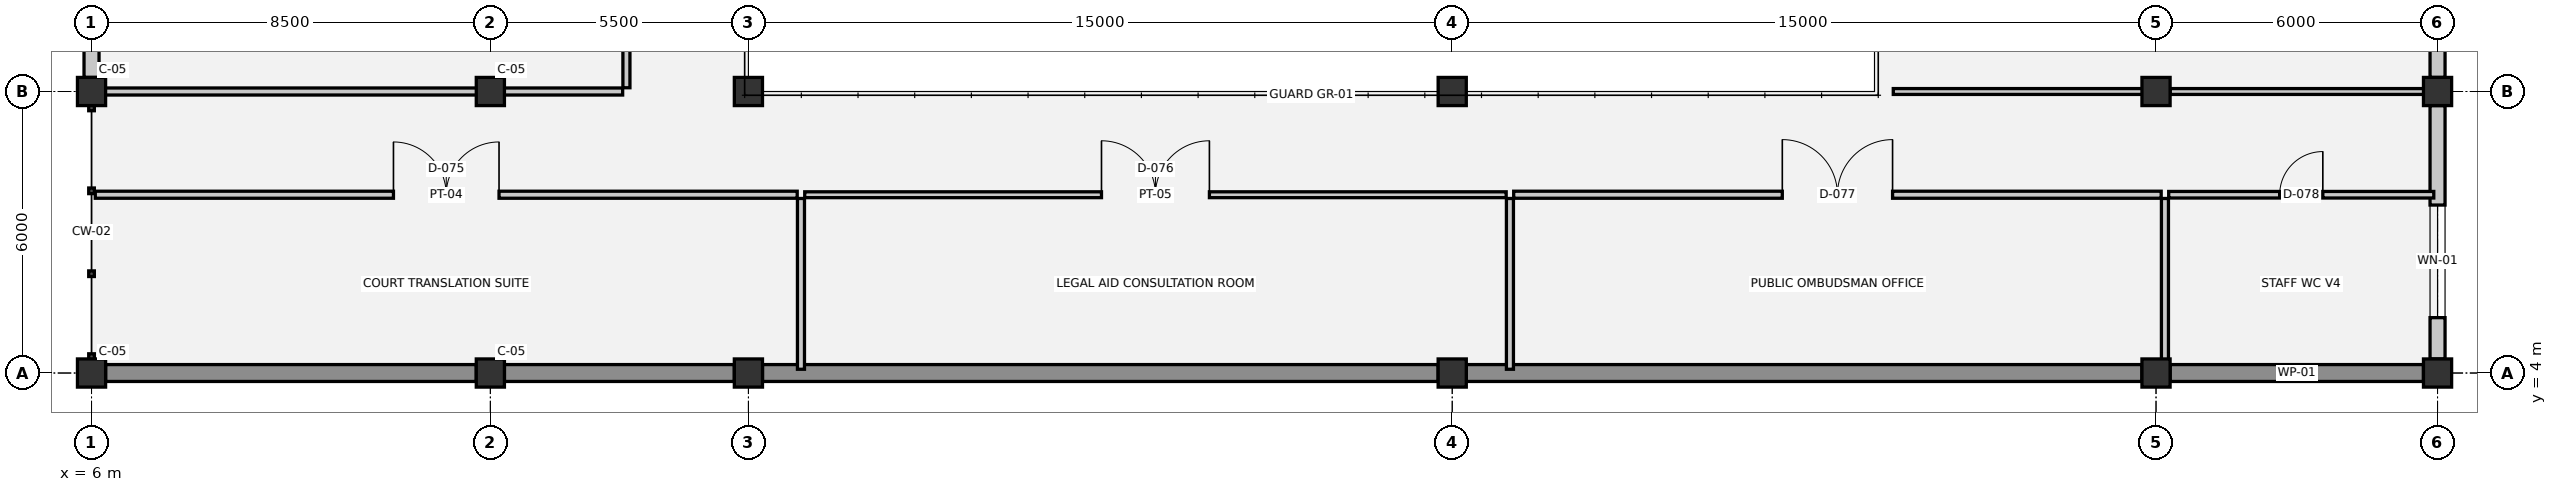
"""IFC4 building model, lengths in metres.
Left out: names, types, materials, properties, quantities, classifications, styles, units other than length and angle.
Written with IfcOpenShell. Run it as: python <this file> out.ifc"""

import sys

from ifc_helpers import new_model, si_unit, direction, frame, frame_2d, origin, origin_2d, place, context, subcontext, project, spatial, rectangle, extrude, element, fill, save


model = new_model("IFC4")
c1 = context("Model", 3, precision=1e-05, world=origin(), true_north=direction((0.0, 1.0)))
c2 = subcontext(c1, "Body", "Model", "MODEL_VIEW")
j1 = project(units=[si_unit("LENGTHUNIT", "METRE"), si_unit("PLANEANGLEUNIT", "RADIAN")], contexts=[c1])
p1 = place(None, origin())
s1 = spatial("IfcSite", under=j1, at=p1, CompositionType="ELEMENT")
p2 = place(p1, origin())
s2 = spatial("IfcBuilding", under=s1, at=p2, CompositionType="ELEMENT")
p3 = place(p2, frame((0.0, 0.0, 9.9)))
s3 = spatial("IfcBuildingStorey", under=s2, at=p3, CompositionType="ELEMENT", Elevation=9.9)
for number, where, z_axis, x_axis in (
    (1, (6.0, 4.0, 0.0), (0.0, 0.0, 1.0), (1.0, 0.0, 0.0)),
    (2, (6.0, 10.0, 0.0), (0.0, 0.0, 1.0), (1.0, 0.0, 0.0)),
    (3, (14.5, 4.0, 0.0), (0.0, 0.0, 1.0), (1.0, 0.0, 0.0)),
    (4, (14.5, 10.0, 0.0), (0.0, 0.0, 1.0), (1.0, 0.0, 0.0)),
    (5, (20.0, 4.0, 0.0), (0.0, 0.0, 1.0), (1.0, 0.0, 0.0)),
    (6, (20.0, 10.0, 0.0), (0.0, 0.0, 1.0), (1.0, 0.0, 0.0)),
    (7, (35.0, 4.0, 0.0), (0.0, 0.0, 1.0), (1.0, 0.0, 0.0)),
    (8, (35.0, 10.0, 0.0), (0.0, 0.0, 1.0), (1.0, 0.0, 0.0)),
    (9, (50.0, 4.0, 0.0), (0.0, 0.0, 1.0), (1.0, 0.0, 0.0)),
    (10, (50.0, 10.0, 0.0), (0.0, 0.0, 1.0), (1.0, 0.0, 0.0)),
    (11, (56.0, 4.0, 0.0), (0.0, 0.0, 1.0), (1.0, 0.0, 0.0)),
    (12, (56.0, 10.0, 0.0), (0.0, 0.0, 1.0), (1.0, 0.0, 0.0)),
):
    element("IfcColumn", number, at=place(p3, frame(where, z_axis=z_axis, x_axis=x_axis)), inside=s3, PredefinedType="COLUMN", context=c2, shape_type="SweptSolid", body=[
        extrude(rectangle(XDim=0.6, YDim=0.6, at=origin_2d()), origin(), (0.0, 0.0, 1.0), 4.5),
    ])
p4 = place(p3, frame((6.0, 10.3, 0.0), z_axis=(0.0, 0.0, 1.0), x_axis=(0.0, 1.0, 0.0)))
e13 = element("IfcWall", 13, at=p4, inside=s3, PredefinedType="SOLIDWALL", context=c2, shape_type="SweptSolid", body=[
    extrude(rectangle(XDim=6.4, YDim=0.32, at=frame_2d((3.2, 0.0))), origin(), (0.0, 0.0, 1.0), 3.26),
])
p5 = place(p4, frame((2.0, 0.0, 0.9)))
e14 = element("IfcOpeningElement", 14, at=p5, cuts=e13, PredefinedType="OPENING", context=c2, shape_type="SweptSolid", body=[
    extrude(rectangle(XDim=2.4, YDim=2.1, at=frame_2d((1.2, 1.05))), frame((0.0, 0.17, 0.0), z_axis=(0.0, -1.0, 0.0), x_axis=(1.0, 0.0, 0.0)), (0.0, 0.0, 1.0), 0.34),
])
p6 = place(p3, frame((56.0, 16.7, 0.0), z_axis=(0.0, 0.0, 1.0), x_axis=(0.0, -1.0, 0.0)))
e15 = element("IfcWall", 15, at=p6, inside=s3, PredefinedType="SOLIDWALL", context=c2, shape_type="SweptSolid", body=[
    extrude(rectangle(XDim=6.4, YDim=0.32, at=frame_2d((3.2, 0.0))), origin(), (0.0, 0.0, 1.0), 3.26),
])
p7 = place(p6, frame((1.975, 0.0, 0.0)))
e16 = element("IfcOpeningElement", 16, at=p7, cuts=e15, PredefinedType="OPENING", context=c2, shape_type="SweptSolid", body=[
    extrude(rectangle(XDim=1.65, YDim=2.2, at=frame_2d((0.825, 1.1))), frame((0.0, 0.17, 0.0), z_axis=(0.0, -1.0, 0.0), x_axis=(1.0, 0.0, 0.0)), (0.0, 0.0, 1.0), 0.34),
])
p8 = place(p3, frame((56.0, 9.7, 0.0), z_axis=(0.0, 0.0, 1.0), x_axis=(0.0, -1.0, 0.0)))
e17 = element("IfcWall", 17, at=p8, inside=s3, PredefinedType="SOLIDWALL", context=c2, shape_type="SweptSolid", body=[
    extrude(rectangle(XDim=5.4, YDim=0.32, at=frame_2d((2.7, 0.0))), origin(), (0.0, 0.0, 1.0), 3.26),
])
p9 = place(p8, frame((2.12, 0.0, 0.9)))
e18 = element("IfcOpeningElement", 18, at=p9, cuts=e17, PredefinedType="OPENING", context=c2, shape_type="SweptSolid", body=[
    extrude(rectangle(XDim=2.4, YDim=2.1, at=frame_2d((1.2, 1.05))), frame((0.0, 0.17, 0.0), z_axis=(0.0, -1.0, 0.0), x_axis=(1.0, 0.0, 0.0)), (0.0, 0.0, 1.0), 0.34),
])
p10 = place(p3, frame((55.7, 4.0, 0.0), z_axis=(0.0, 0.0, 1.0), x_axis=(-1.0, 0.0, 0.0)))
e19 = element("IfcWall", 19, at=p10, inside=s3, PredefinedType="SOLIDWALL", context=c2, shape_type="SweptSolid", body=[
    extrude(rectangle(XDim=5.4, YDim=0.36, at=frame_2d((2.7, 0.0))), origin(), (0.0, 0.0, 1.0), 4.24),
])
for number, where, z_axis, x_axis in (
    (20, (49.7, 4.0, 0.0), (0.0, 0.0, 1.0), (-1.0, 0.0, 0.0)),
    (21, (34.7, 4.0, 0.0), (0.0, 0.0, 1.0), (-1.0, 0.0, 0.0)),
):
    element("IfcWall", number, at=place(p3, frame(where, z_axis=z_axis, x_axis=x_axis)), inside=s3, PredefinedType="SOLIDWALL", context=c2, shape_type="SweptSolid", body=[
        extrude(rectangle(XDim=14.4, YDim=0.36, at=frame_2d((7.2, 0.0))), origin(), (0.0, 0.0, 1.0), 4.24),
    ])
p11 = place(p3, frame((19.7, 4.0, 0.0), z_axis=(0.0, 0.0, 1.0), x_axis=(-1.0, 0.0, 0.0)))
e22 = element("IfcWall", 22, at=p11, inside=s3, PredefinedType="SOLIDWALL", context=c2, shape_type="SweptSolid", body=[
    extrude(rectangle(XDim=4.9, YDim=0.36, at=frame_2d((2.45, 0.0))), origin(), (0.0, 0.0, 1.0), 4.24),
])
p12 = place(p3, frame((14.2, 4.0, 0.0), z_axis=(0.0, 0.0, 1.0), x_axis=(-1.0, 0.0, 0.0)))
e23 = element("IfcWall", 23, at=p12, inside=s3, PredefinedType="SOLIDWALL", context=c2, shape_type="SweptSolid", body=[
    extrude(rectangle(XDim=7.9, YDim=0.36, at=frame_2d((3.95, 0.0))), origin(), (0.0, 0.0, 1.0), 4.24),
])
p13 = place(p3, frame((6.08, 7.8, 0.0), z_axis=(0.0, 0.0, 1.0), x_axis=(1.0, 0.0, 0.0)))
e24 = element("IfcWall", 24, at=p13, inside=s3, PredefinedType="PARTITIONING", context=c2, shape_type="SweptSolid", body=[
    extrude(rectangle(XDim=14.96, YDim=0.15, at=frame_2d((7.48, 0.0))), origin(), (0.0, 0.0, 1.0), 4.14),
])
p14 = place(p13, frame((6.355, 0.0, 0.0)))
e25 = element("IfcOpeningElement", 25, at=p14, cuts=e24, PredefinedType="OPENING", context=c2, shape_type="SweptSolid", body=[
    extrude(rectangle(XDim=2.25, YDim=2.4, at=frame_2d((1.125, 1.2))), frame((0.0, 0.085, 0.0), z_axis=(0.0, -1.0, 0.0), x_axis=(1.0, 0.0, 0.0)), (0.0, 0.0, 1.0), 0.17),
])
p15 = place(p3, frame((21.2, 7.8, 0.0), z_axis=(0.0, 0.0, 1.0), x_axis=(1.0, 0.0, 0.0)))
e26 = element("IfcWall", 26, at=p15, inside=s3, PredefinedType="PARTITIONING", context=c2, shape_type="SweptSolid", body=[
    extrude(rectangle(XDim=14.95, YDim=0.125, at=frame_2d((7.475, 0.0))), origin(), (0.0, 0.0, 1.0), 4.14),
])
p16 = place(p15, frame((6.325, 0.0, 0.0)))
e27 = element("IfcOpeningElement", 27, at=p16, cuts=e26, PredefinedType="OPENING", context=c2, shape_type="SweptSolid", body=[
    extrude(rectangle(XDim=2.3, YDim=2.4, at=frame_2d((1.15, 1.2))), frame((0.0, 0.073, 0.0), z_axis=(0.0, -1.0, 0.0), x_axis=(1.0, 0.0, 0.0)), (0.0, 0.0, 1.0), 0.145),
])
p17 = place(p3, frame((36.31, 7.8, 0.0), z_axis=(0.0, 0.0, 1.0), x_axis=(1.0, 0.0, 0.0)))
e28 = element("IfcWall", 28, at=p17, inside=s3, PredefinedType="PARTITIONING", context=c2, shape_type="SweptSolid", body=[
    extrude(rectangle(XDim=13.8, YDim=0.15, at=frame_2d((6.9, 0.0))), origin(), (0.0, 0.0, 1.0), 4.14),
])
p18 = place(p17, frame((5.725, 0.0, 0.0)))
e29 = element("IfcOpeningElement", 29, at=p18, cuts=e28, PredefinedType="OPENING", context=c2, shape_type="SweptSolid", body=[
    extrude(rectangle(XDim=2.35, YDim=2.4, at=frame_2d((1.175, 1.2))), frame((0.0, 0.085, 0.0), z_axis=(0.0, -1.0, 0.0), x_axis=(1.0, 0.0, 0.0)), (0.0, 0.0, 1.0), 0.17),
])
p19 = place(p3, frame((50.27, 7.8, 0.0), z_axis=(0.0, 0.0, 1.0), x_axis=(1.0, 0.0, 0.0)))
e30 = element("IfcWall", 30, at=p19, inside=s3, PredefinedType="PLUMBINGWALL", context=c2, shape_type="SweptSolid", body=[
    extrude(rectangle(XDim=5.65, YDim=0.14, at=frame_2d((2.825, 0.0))), origin(), (0.0, 0.0, 1.0), 4.14),
])
p20 = place(p19, frame((2.365, 0.0, 0.0)))
e31 = element("IfcOpeningElement", 31, at=p20, cuts=e30, PredefinedType="OPENING", context=c2, shape_type="SweptSolid", body=[
    extrude(rectangle(XDim=0.92, YDim=2.1, at=frame_2d((0.46, 1.05))), frame((0.0, 0.08, 0.0), z_axis=(0.0, -1.0, 0.0), x_axis=(1.0, 0.0, 0.0)), (0.0, 0.0, 1.0), 0.16),
])
p21 = place(p3, frame((6.08, 10.0, 0.0), z_axis=(0.0, 0.0, 1.0), x_axis=(1.0, 0.0, 0.0)))
e32 = element("IfcWall", 32, at=p21, inside=s3, PredefinedType="PARTITIONING", context=c2, shape_type="SweptSolid", body=[
    extrude(rectangle(XDim=11.24, YDim=0.15, at=frame_2d((5.62, 0.0))), origin(), (0.0, 0.0, 1.0), 3.53),
])
p22 = place(p3, frame((44.4, 10.0, 0.0), z_axis=(0.0, 0.0, 1.0), x_axis=(1.0, 0.0, 0.0)))
e33 = element("IfcWall", 33, at=p22, inside=s3, PredefinedType="PARTITIONING", context=c2, shape_type="SweptSolid", body=[
    extrude(rectangle(XDim=5.9, YDim=0.125, at=frame_2d((2.95, 0.0))), origin(), (0.0, 0.0, 1.0), 3.28),
])
p23 = place(p3, frame((50.3, 10.0, 0.0), z_axis=(0.0, 0.0, 1.0), x_axis=(1.0, 0.0, 0.0)))
e34 = element("IfcWall", 34, at=p23, inside=s3, PredefinedType="PARTITIONING", context=c2, shape_type="SweptSolid", body=[
    extrude(rectangle(XDim=5.62, YDim=0.125, at=frame_2d((2.81, 0.0))), origin(), (0.0, 0.0, 1.0), 3.53),
])
p24 = place(p3, frame((17.4, 10.08, 0.0), z_axis=(0.0, 0.0, 1.0), x_axis=(0.0, 1.0, 0.0)))
e35 = element("IfcWall", 35, at=p24, inside=s3, PredefinedType="PARTITIONING", context=c2, shape_type="SweptSolid", body=[
    extrude(rectangle(XDim=14.72, YDim=0.15, at=frame_2d((7.36, 0.0))), origin(), (0.0, 0.0, 1.0), 4.14),
])
p25 = place(p24, frame((6.31, 0.0, 0.0)))
e36 = element("IfcOpeningElement", 36, at=p25, cuts=e35, PredefinedType="OPENING", context=c2, shape_type="SweptSolid", body=[
    extrude(rectangle(XDim=2.1, YDim=2.35, at=frame_2d((1.05, 1.175))), frame((0.0, 0.085, 0.0), z_axis=(0.0, -1.0, 0.0), x_axis=(1.0, 0.0, 0.0)), (0.0, 0.0, 1.0), 0.17),
])
for number, where, z_axis, x_axis in (
    (37, (21.12, 4.08, 0.0), (0.0, 0.0, 1.0), (0.0, 1.0, 0.0)),
    (38, (36.23, 4.08, 0.0), (0.0, 0.0, 1.0), (0.0, 1.0, 0.0)),
):
    element("IfcWall", number, at=place(p3, frame(where, z_axis=z_axis, x_axis=x_axis)), inside=s3, PredefinedType="PARTITIONING", context=c2, shape_type="SweptSolid", body=[
        extrude(rectangle(XDim=3.64, YDim=0.15, at=frame_2d((1.82, 0.0))), origin(), (0.0, 0.0, 1.0), 4.14),
    ])
p26 = place(p3, frame((50.19, 4.08, 0.0), z_axis=(0.0, 0.0, 1.0), x_axis=(0.0, 1.0, 0.0)))
e39 = element("IfcWall", 39, at=p26, inside=s3, PredefinedType="PARTITIONING", context=c2, shape_type="SweptSolid", body=[
    extrude(rectangle(XDim=3.64, YDim=0.15, at=frame_2d((1.82, 0.0))), origin(), (0.0, 0.0, 1.0), 3.68),
])
p27 = place(p9, origin())
e40 = element("IfcWindow", 40, at=p27, inside=s3, PartitioningType="SINGLE_PANEL", PredefinedType="WINDOW", context=c2, shape_type="SweptSolid", body=[
    extrude(rectangle(XDim=2.4, YDim=2.1, at=frame_2d((1.2, 1.05))), frame((0.0, 0.03, 0.0), z_axis=(0.0, -1.0, 0.0), x_axis=(1.0, 0.0, 0.0)), (0.0, 0.0, 1.0), 0.06),
])
fill(e18, e40)
p28 = place(p14, origin())
e41 = element("IfcDoor", 41, at=p28, inside=s3, OperationType="DOUBLE_DOOR_SINGLE_SWING", PredefinedType="DOOR", context=c2, shape_type="SweptSolid", body=[
    extrude(rectangle(XDim=2.25, YDim=2.4, at=frame_2d((1.125, 1.2))), frame((0.0, 0.025, 0.0), z_axis=(0.0, -1.0, 0.0), x_axis=(1.0, 0.0, 0.0)), (0.0, 0.0, 1.0), 0.05),
])
fill(e25, e41)
p29 = place(p16, origin())
e42 = element("IfcDoor", 42, at=p29, inside=s3, OperationType="DOUBLE_DOOR_SINGLE_SWING", PredefinedType="DOOR", context=c2, shape_type="SweptSolid", body=[
    extrude(rectangle(XDim=2.3, YDim=2.4, at=frame_2d((1.15, 1.2))), frame((0.0, 0.025, 0.0), z_axis=(0.0, -1.0, 0.0), x_axis=(1.0, 0.0, 0.0)), (0.0, 0.0, 1.0), 0.05),
])
fill(e27, e42)
p30 = place(p18, origin())
e43 = element("IfcDoor", 43, at=p30, inside=s3, OperationType="DOUBLE_DOOR_SINGLE_SWING", PredefinedType="DOOR", context=c2, shape_type="SweptSolid", body=[
    extrude(rectangle(XDim=2.35, YDim=2.4, at=frame_2d((1.175, 1.2))), frame((0.0, 0.025, 0.0), z_axis=(0.0, -1.0, 0.0), x_axis=(1.0, 0.0, 0.0)), (0.0, 0.0, 1.0), 0.05),
])
fill(e29, e43)
p31 = place(p20, origin())
e44 = element("IfcDoor", 44, at=p31, inside=s3, OperationType="SINGLE_SWING_RIGHT", PredefinedType="DOOR", context=c2, shape_type="SweptSolid", body=[
    extrude(rectangle(XDim=0.92, YDim=2.1, at=frame_2d((0.46, 1.05))), frame((0.0, 0.025, 0.0), z_axis=(0.0, -1.0, 0.0), x_axis=(1.0, 0.0, 0.0)), (0.0, 0.0, 1.0), 0.05),
])
fill(e31, e44)
save(model, sys.argv[1])
